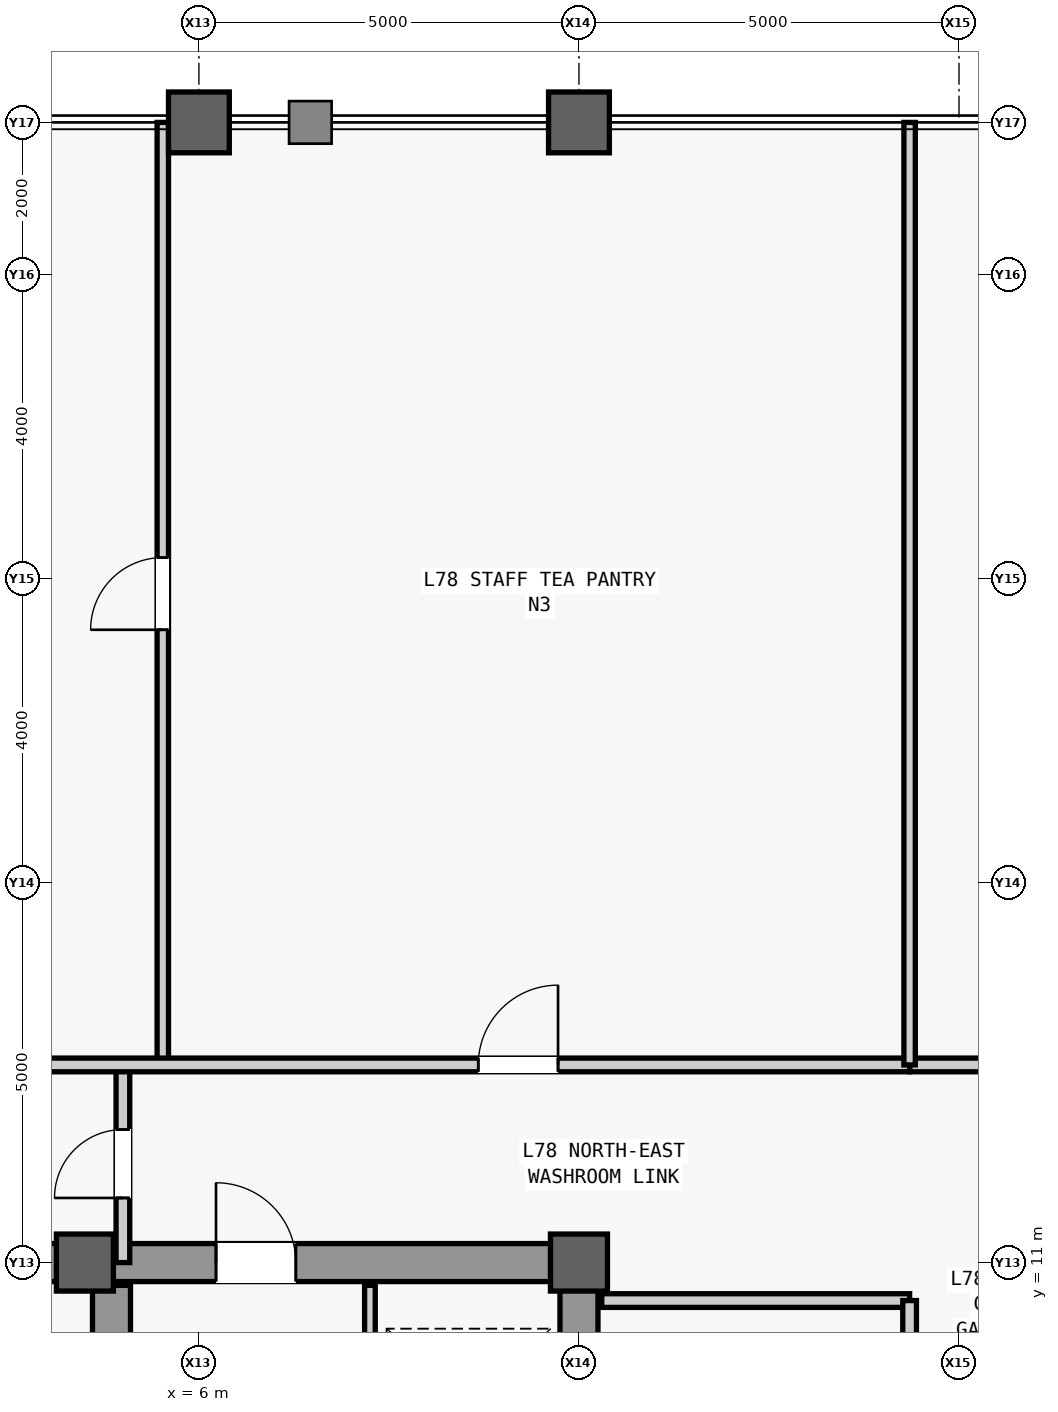
"""IFC4 building model, lengths in metres.
Left out: names, types, materials, properties, quantities, classifications, styles, units other than length and angle.
Written with IfcOpenShell. Run it as: python <this file> out.ifc"""

import sys

from ifc_helpers import new_model, si_unit, direction, frame, frame_2d, origin, origin_2d, place, context, subcontext, project, spatial, rectangle, hollow_rectangle, extrude, source, transform, mapped, element, fill, save


model = new_model("IFC4")
c1 = context("Model", 3, precision=1e-05, world=origin(), true_north=direction((0.0, 1.0)))
c2 = subcontext(c1, "Body", "Model", "MODEL_VIEW")
j1 = project(units=[si_unit("LENGTHUNIT", "METRE"), si_unit("PLANEANGLEUNIT", "RADIAN")], contexts=[c1])
p1 = place(None, origin())
s1 = spatial("IfcSite", under=j1, at=p1, CompositionType="ELEMENT")
p2 = place(p1, origin())
s2 = spatial("IfcBuilding", under=s1, at=p2, CompositionType="ELEMENT")
p3 = place(p2, frame((0.0, 0.0, 330.3)))
s3 = spatial("IfcBuildingStorey", under=s2, at=p3, CompositionType="ELEMENT", Elevation=330.3)
m1 = source(origin(), c2, "Body", "SweptSolid", [
    extrude(rectangle(XDim=22.0, YDim=0.5, at=frame_2d((11.0, 0.0))), origin(), (0.0, 0.0, 1.0), 3.74),
])
p4 = place(p3, frame((11.0, -11.0, 0.0), z_axis=(0.0, 0.0, 1.0), x_axis=(0.0, 1.0, 0.0)))
e1 = element("IfcWall", 1, at=p4, inside=s3, PredefinedType="SHEAR", context=c2, shape_type="MappedRepresentation", body=[
    mapped(m1, transform((0.0, 0.0, 0.0), scale=1.0)),
])
m2 = source(origin(), c2, "Body", "SweptSolid", [
    extrude(rectangle(XDim=1.1, YDim=2.2, at=frame_2d((0.55, 1.1))), frame((0.0, 0.26, 0.0), z_axis=(0.0, -1.0, 0.0), x_axis=(1.0, 0.0, 0.0)), (0.0, 0.0, 1.0), 0.52),
])
p5 = place(p4, frame((0.8, 0.0, 0.0)))
e2 = element("IfcOpeningElement", 2, at=p5, cuts=e1, PredefinedType="OPENING", context=c2, shape_type="MappedRepresentation", body=[
    mapped(m2, transform((0.0, 0.0, 0.0), scale=1.0)),
])
m3 = source(origin(), c2, "Body", "SweptSolid", [
    extrude(rectangle(XDim=0.9, YDim=2.15, at=frame_2d((0.45, 1.075))), frame((0.0, 0.26, 0.0), z_axis=(0.0, -1.0, 0.0), x_axis=(1.0, 0.0, 0.0)), (0.0, 0.0, 1.0), 0.52),
])
p6 = place(p4, frame((6.2, 0.0, 0.0)))
e3 = element("IfcOpeningElement", 3, at=p6, cuts=e1, PredefinedType="OPENING", context=c2, shape_type="MappedRepresentation", body=[
    mapped(m3, transform((0.0, 0.0, 0.0), scale=1.0)),
])
p7 = place(p4, frame((8.05, 0.0, 0.0)))
e4 = element("IfcOpeningElement", 4, at=p7, cuts=e1, PredefinedType="OPENING", context=c2, shape_type="MappedRepresentation", body=[
    mapped(m3, transform((0.0, 0.0, 0.0), scale=1.0)),
])
m4 = source(origin(), c2, "Body", "SweptSolid", [
    extrude(rectangle(XDim=1.2, YDim=2.3, at=frame_2d((0.6, 1.15))), frame((0.0, 0.26, 0.0), z_axis=(0.0, -1.0, 0.0), x_axis=(1.0, 0.0, 0.0)), (0.0, 0.0, 1.0), 0.52),
])
p8 = place(p4, frame((17.6, 0.0, 0.0)))
e5 = element("IfcOpeningElement", 5, at=p8, cuts=e1, PredefinedType="OPENING", context=c2, shape_type="MappedRepresentation", body=[
    mapped(m4, transform((0.0, 0.0, 0.0), scale=1.0)),
])
p9 = place(p4, frame((19.6, 0.0, 0.0)))
e6 = element("IfcOpeningElement", 6, at=p9, cuts=e1, PredefinedType="OPENING", context=c2, shape_type="MappedRepresentation", body=[
    mapped(m4, transform((0.0, 0.0, 0.0), scale=1.0)),
])
m5 = source(origin(), c2, "Body", "SweptSolid", [
    extrude(rectangle(XDim=1.3, YDim=2.3, at=frame_2d((0.65, 1.15))), frame((0.0, 0.26, 0.0), z_axis=(0.0, -1.0, 0.0), x_axis=(1.0, 0.0, 0.0)), (0.0, 0.0, 1.0), 0.52),
])
p10 = place(p4, frame((2.7, 0.0, 0.0)))
e7 = element("IfcOpeningElement", 7, at=p10, cuts=e1, PredefinedType="OPENING", context=c2, shape_type="MappedRepresentation", body=[
    mapped(m5, transform((0.0, 0.0, 0.0), scale=1.0)),
])
p11 = place(p4, frame((13.35, 0.0, 0.0)))
e8 = element("IfcOpeningElement", 8, at=p11, cuts=e1, PredefinedType="OPENING", context=c2, shape_type="MappedRepresentation", body=[
    mapped(m5, transform((0.0, 0.0, 0.0), scale=1.0)),
])
m6 = source(origin(), c2, "Body", "SweptSolid", [
    extrude(rectangle(XDim=21.4, YDim=0.5, at=frame_2d((10.7, 0.0))), origin(), (0.0, 0.0, 1.0), 3.74),
])
p12 = place(p3, frame((4.85, -10.7, 0.0), z_axis=(0.0, 0.0, 1.0), x_axis=(0.0, 1.0, 0.0)))
e9 = element("IfcWall", 9, at=p12, inside=s3, PredefinedType="SHEAR", context=c2, shape_type="MappedRepresentation", body=[
    mapped(m6, transform((0.0, 0.0, 0.0), scale=1.0)),
])
m7 = source(origin(), c2, "Body", "SweptSolid", [
    extrude(rectangle(XDim=5.9, YDim=0.5, at=frame_2d((2.95, 0.0))), origin(), (0.0, 0.0, 1.0), 3.74),
])
p13 = place(p3, frame((4.85, 11.0, 0.0), z_axis=(0.0, 0.0, 1.0), x_axis=(1.0, 0.0, 0.0)))
e10 = element("IfcWall", 10, at=p13, inside=s3, PredefinedType="SHEAR", context=c2, shape_type="MappedRepresentation", body=[
    mapped(m7, transform((0.0, 0.0, 0.0), scale=1.0)),
])
m8 = source(origin(), c2, "Body", "SweptSolid", [
    extrude(rectangle(XDim=1.05, YDim=2.2, at=frame_2d((0.525, 1.1))), frame((0.0, 0.26, 0.0), z_axis=(0.0, -1.0, 0.0), x_axis=(1.0, 0.0, 0.0)), (0.0, 0.0, 1.0), 0.52),
])
p14 = place(p13, frame((1.375, 0.0, 0.0)))
e11 = element("IfcOpeningElement", 11, at=p14, cuts=e10, PredefinedType="OPENING", context=c2, shape_type="MappedRepresentation", body=[
    mapped(m8, transform((0.0, 0.0, 0.0), scale=1.0)),
])
m9 = source(origin(), c2, "Body", "SweptSolid", [
    extrude(rectangle(XDim=9.2, YDim=0.5, at=frame_2d((4.6, 0.0))), origin(), (0.0, 0.0, 1.0), 3.74),
])
p15 = place(p3, frame((-4.6, 11.0, 0.0), z_axis=(0.0, 0.0, 1.0), x_axis=(1.0, 0.0, 0.0)))
e12 = element("IfcWall", 12, at=p15, inside=s3, PredefinedType="SHEAR", context=c2, shape_type="MappedRepresentation", body=[
    mapped(m9, transform((0.0, 0.0, 0.0), scale=1.0)),
])
m10 = source(origin(), c2, "Body", "SweptSolid", [
    extrude(rectangle(XDim=0.75, YDim=0.75, at=origin_2d()), origin(), (0.0, 0.0, 1.0), 4.0),
])
p16 = place(p3, frame((4.5, 11.0, 0.0), z_axis=(0.0, 0.0, 1.0), x_axis=(1.0, 0.0, 0.0)))
e13 = element("IfcColumn", 13, at=p16, inside=s3, PredefinedType="COLUMN", context=c2, shape_type="MappedRepresentation", body=[
    mapped(m10, transform((0.0, 0.0, 0.0), scale=1.0)),
])
m11 = source(origin(), c2, "Body", "SweptSolid", [
    extrude(hollow_rectangle(XDim=0.8, YDim=0.8, WallThickness=0.045, at=origin_2d()), origin(), (0.0, 0.0, 1.0), 4.0),
])
p17 = place(p3, frame((6.0, 26.0, 0.0), z_axis=(0.0, 0.0, 1.0), x_axis=(1.0, 0.0, 0.0)))
e14 = element("IfcColumn", 14, at=p17, inside=s3, PredefinedType="COLUMN", context=c2, shape_type="MappedRepresentation", body=[
    mapped(m11, transform((0.0, 0.0, 0.0), scale=1.0)),
])
p18 = place(p3, frame((11.0, 11.0, 0.0), z_axis=(0.0, 0.0, 1.0), x_axis=(1.0, 0.0, 0.0)))
e15 = element("IfcColumn", 15, at=p18, inside=s3, PredefinedType="COLUMN", context=c2, shape_type="MappedRepresentation", body=[
    mapped(m10, transform((0.0, 0.0, 0.0), scale=1.0)),
])
p19 = place(p3, frame((11.0, 26.0, 0.0), z_axis=(0.0, 0.0, 1.0), x_axis=(1.0, 0.0, 0.0)))
e16 = element("IfcColumn", 16, at=p19, inside=s3, PredefinedType="COLUMN", context=c2, shape_type="MappedRepresentation", body=[
    mapped(m11, transform((0.0, 0.0, 0.0), scale=1.0)),
])
m12 = source(origin(), c2, "Body", "SweptSolid", [
    extrude(rectangle(XDim=9.4, YDim=0.14, at=frame_2d((4.7, 0.0))), origin(), (0.0, 0.0, 1.0), 3.74),
])
p20 = place(p3, frame((8.25, 1.3, 0.0), z_axis=(0.0, 0.0, 1.0), x_axis=(0.0, 1.0, 0.0)))
e17 = element("IfcWall", 17, at=p20, inside=s3, PredefinedType="PARTITIONING", context=c2, shape_type="MappedRepresentation", body=[
    mapped(m12, transform((0.0, 0.0, 0.0), scale=1.0)),
])
m13 = source(origin(), c2, "Body", "SweptSolid", [
    extrude(rectangle(XDim=4.05, YDim=0.18, at=frame_2d((2.025, 0.0))), origin(), (0.0, 0.0, 1.0), 3.74),
])
p21 = place(p3, frame((11.3, 10.5, 0.0), z_axis=(0.0, 0.0, 1.0), x_axis=(1.0, 0.0, 0.0)))
e18 = element("IfcWall", 18, at=p21, inside=s3, PredefinedType="PARTITIONING", context=c2, shape_type="MappedRepresentation", body=[
    mapped(m13, transform((0.0, 0.0, 0.0), scale=1.0)),
])
m14 = source(origin(), c2, "Body", "SweptSolid", [
    extrude(rectangle(XDim=16.6, YDim=0.18, at=frame_2d((8.3, 0.0))), origin(), (0.0, 0.0, 1.0), 3.74),
])
p22 = place(p3, frame((15.35, -6.1, 0.0), z_axis=(0.0, 0.0, 1.0), x_axis=(0.0, 1.0, 0.0)))
e19 = element("IfcWall", 19, at=p22, inside=s3, PredefinedType="PARTITIONING", context=c2, shape_type="MappedRepresentation", body=[
    mapped(m14, transform((0.0, 0.0, 0.0), scale=1.0)),
])
m15 = source(origin(), c2, "Body", "SweptSolid", [
    extrude(rectangle(XDim=1.8, YDim=2.25, at=frame_2d((0.9, 1.125))), frame((0.0, 0.1, 0.0), z_axis=(0.0, -1.0, 0.0), x_axis=(1.0, 0.0, 0.0)), (0.0, 0.0, 1.0), 0.2),
])
p23 = place(p22, frame((2.7, 0.0, 0.0)))
e20 = element("IfcOpeningElement", 20, at=p23, cuts=e19, PredefinedType="OPENING", context=c2, shape_type="MappedRepresentation", body=[
    mapped(m15, transform((0.0, 0.0, 0.0), scale=1.0)),
])
p24 = place(p22, frame((13.0, 0.0, 0.0)))
e21 = element("IfcOpeningElement", 21, at=p24, cuts=e19, PredefinedType="OPENING", context=c2, shape_type="MappedRepresentation", body=[
    mapped(m15, transform((0.0, 0.0, 0.0), scale=1.0)),
])
m16 = source(origin(), c2, "Body", "SweptSolid", [
    extrude(rectangle(XDim=2.6, YDim=0.18, at=frame_2d((1.3, 0.0))), origin(), (0.0, 0.0, 1.0), 3.74),
])
p25 = place(p3, frame((5.0, 11.0, 0.0), z_axis=(0.0, 0.0, 1.0), x_axis=(0.0, 1.0, 0.0)))
e22 = element("IfcWall", 22, at=p25, inside=s3, PredefinedType="PARTITIONING", context=c2, shape_type="MappedRepresentation", body=[
    mapped(m16, transform((0.0, 0.0, 0.0), scale=1.0)),
])
m17 = source(origin(), c2, "Body", "SweptSolid", [
    extrude(rectangle(XDim=0.9, YDim=2.15, at=frame_2d((0.45, 1.075))), frame((0.0, 0.1, 0.0), z_axis=(0.0, -1.0, 0.0), x_axis=(1.0, 0.0, 0.0)), (0.0, 0.0, 1.0), 0.2),
])
p26 = place(p25, frame((0.85, 0.0, 0.0)))
e23 = element("IfcOpeningElement", 23, at=p26, cuts=e22, PredefinedType="OPENING", context=c2, shape_type="MappedRepresentation", body=[
    mapped(m17, transform((0.0, 0.0, 0.0), scale=1.0)),
])
m18 = source(origin(), c2, "Body", "SweptSolid", [
    extrude(rectangle(XDim=2.4, YDim=0.18, at=frame_2d((1.2, 0.0))), origin(), (0.0, 0.0, 1.0), 3.74),
])
p27 = place(p3, frame((15.35, 13.6, 0.0), z_axis=(0.0, 0.0, 1.0), x_axis=(1.0, 0.0, 0.0)))
e24 = element("IfcWall", 24, at=p27, inside=s3, PredefinedType="PARTITIONING", context=c2, shape_type="MappedRepresentation", body=[
    mapped(m18, transform((0.0, 0.0, 0.0), scale=1.0)),
])
m19 = source(origin(), c2, "Body", "SweptSolid", [
    extrude(rectangle(XDim=12.4, YDim=0.15, at=frame_2d((6.2, 0.0))), origin(), (0.0, 0.0, 1.0), 3.74),
])
p28 = place(p3, frame((5.525, 13.6, 0.0), z_axis=(0.0, 0.0, 1.0), x_axis=(0.0, 1.0, 0.0)))
e25 = element("IfcWall", 25, at=p28, inside=s3, PredefinedType="PARTITIONING", context=c2, shape_type="MappedRepresentation", body=[
    mapped(m19, transform((0.0, 0.0, 0.0), scale=1.0)),
])
m20 = source(origin(), c2, "Body", "SweptSolid", [
    extrude(rectangle(XDim=0.95, YDim=2.15, at=frame_2d((0.475, 1.075))), frame((0.0, 0.085, 0.0), z_axis=(0.0, -1.0, 0.0), x_axis=(1.0, 0.0, 0.0)), (0.0, 0.0, 1.0), 0.17),
])
p29 = place(p28, frame((5.725, 0.0, 0.0)))
e26 = element("IfcOpeningElement", 26, at=p29, cuts=e25, PredefinedType="OPENING", context=c2, shape_type="MappedRepresentation", body=[
    mapped(m20, transform((0.0, 0.0, 0.0), scale=1.0)),
])
m21 = source(origin(), c2, "Body", "SweptSolid", [
    extrude(rectangle(XDim=32.75, YDim=0.18, at=frame_2d((16.375, 0.0))), origin(), (0.0, 0.0, 1.0), 3.74),
])
p30 = place(p3, frame((-17.4, 13.6, 0.0), z_axis=(0.0, 0.0, 1.0), x_axis=(1.0, 0.0, 0.0)))
e27 = element("IfcWall", 27, at=p30, inside=s3, PredefinedType="PARTITIONING", context=c2, shape_type="MappedRepresentation", body=[
    mapped(m21, transform((0.0, 0.0, 0.0), scale=1.0)),
])
m22 = source(origin(), c2, "Body", "SweptSolid", [
    extrude(rectangle(XDim=1.05, YDim=2.2, at=frame_2d((0.525, 1.1))), frame((0.0, 0.1, 0.0), z_axis=(0.0, -1.0, 0.0), x_axis=(1.0, 0.0, 0.0)), (0.0, 0.0, 1.0), 0.2),
])
p31 = place(p30, frame((27.075, 0.0, 0.0)))
e28 = element("IfcOpeningElement", 28, at=p31, cuts=e27, PredefinedType="OPENING", context=c2, shape_type="MappedRepresentation", body=[
    mapped(m22, transform((0.0, 0.0, 0.0), scale=1.0)),
])
p32 = place(p3, frame((15.35, 13.6, 0.0), z_axis=(0.0, 0.0, 1.0), x_axis=(0.0, 1.0, 0.0)))
e29 = element("IfcWall", 29, at=p32, inside=s3, PredefinedType="PARTITIONING", context=c2, shape_type="MappedRepresentation", body=[
    mapped(m19, transform((0.0, 0.0, 0.0), scale=1.0)),
])
m23 = source(origin(), c2, "Body", "SweptSolid", [
    extrude(rectangle(XDim=1.05, YDim=2.2, at=frame_2d((0.525, 1.1))), frame((0.0, 0.025, 0.0), z_axis=(0.0, -1.0, 0.0), x_axis=(1.0, 0.0, 0.0)), (0.0, 0.0, 1.0), 0.05),
])
p33 = place(p14, origin())
e30 = element("IfcDoor", 30, at=p33, inside=s3, OperationType="SINGLE_SWING_LEFT", PredefinedType="DOOR", context=c2, shape_type="MappedRepresentation", body=[
    mapped(m23, transform((0.0, 0.0, 0.0), scale=1.0)),
])
fill(e11, e30)
m24 = source(origin(), c2, "Body", "SweptSolid", [
    extrude(rectangle(XDim=0.9, YDim=2.15, at=frame_2d((0.45, 1.075))), frame((0.0, 0.025, 0.0), z_axis=(0.0, -1.0, 0.0), x_axis=(1.0, 0.0, 0.0)), (0.0, 0.0, 1.0), 0.05),
])
p34 = place(p26, origin())
e31 = element("IfcDoor", 31, at=p34, inside=s3, OperationType="SINGLE_SWING_LEFT", PredefinedType="DOOR", context=c2, shape_type="MappedRepresentation", body=[
    mapped(m24, transform((0.0, 0.0, 0.0), scale=1.0)),
])
fill(e23, e31)
m25 = source(origin(), c2, "Body", "SweptSolid", [
    extrude(rectangle(XDim=0.95, YDim=2.15, at=frame_2d((0.475, 1.075))), frame((0.0, 0.025, 0.0), z_axis=(0.0, -1.0, 0.0), x_axis=(1.0, 0.0, 0.0)), (0.0, 0.0, 1.0), 0.05),
])
p35 = place(p29, origin())
e32 = element("IfcDoor", 32, at=p35, inside=s3, OperationType="SINGLE_SWING_LEFT", PredefinedType="DOOR", context=c2, shape_type="MappedRepresentation", body=[
    mapped(m25, transform((0.0, 0.0, 0.0), scale=1.0)),
])
fill(e26, e32)
p36 = place(p31, origin())
e33 = element("IfcDoor", 33, at=p36, inside=s3, OperationType="SINGLE_SWING_RIGHT", PredefinedType="DOOR", context=c2, shape_type="MappedRepresentation", body=[
    mapped(m23, transform((0.0, 0.0, 0.0), scale=1.0)),
])
fill(e28, e33)
save(model, sys.argv[1])
